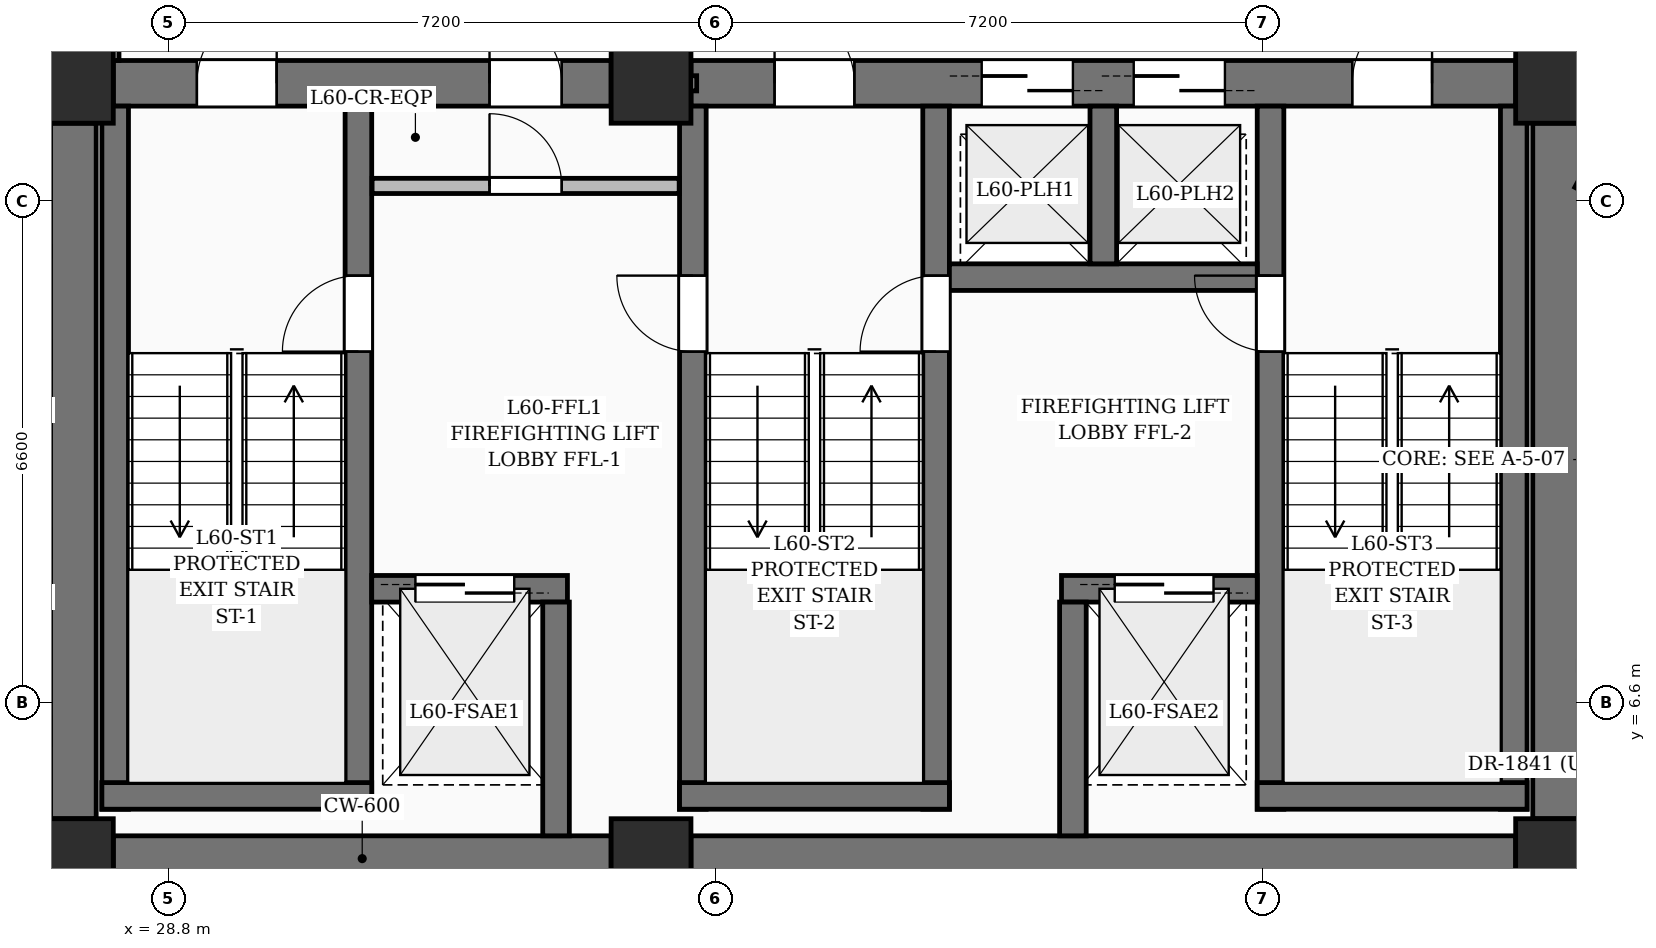
"""IFC4 building model, lengths in metres.
Left out: names, types, materials, properties, quantities, classifications, styles, units other than length and angle.
Written with IfcOpenShell. Run it as: python <this file> out.ifc"""

import sys

from ifc_helpers import new_model, si_unit, direction, frame, frame_2d, origin, origin_2d, place, context, subcontext, project, spatial, rectangle, extrude, element, fill, save


model = new_model("IFC4")
c1 = context("Model", 3, precision=1e-05, world=origin(), true_north=direction((0.0, 1.0)))
c2 = subcontext(c1, "Body", "Model", "MODEL_VIEW")
j1 = project(units=[si_unit("LENGTHUNIT", "METRE"), si_unit("PLANEANGLEUNIT", "RADIAN")], contexts=[c1])
p1 = place(None, origin())
s1 = spatial("IfcSite", under=j1, at=p1, CompositionType="ELEMENT")
p2 = place(p1, origin())
s2 = spatial("IfcBuilding", under=s1, at=p2, CompositionType="ELEMENT")
p3 = place(p2, frame((0.0, 0.0, 233.25)))
s3 = spatial("IfcBuildingStorey", under=s2, at=p3, CompositionType="ELEMENT", Elevation=233.25)
for number, where, z_axis, x_axis in (
    (1, (27.55, 4.55, 0.0), (0.0, 0.0, 1.0), (1.0, 0.0, 0.0)),
    (2, (35.15, 4.55, 0.0), (0.0, 0.0, 1.0), (1.0, 0.0, 0.0)),
    (3, (47.05, 4.55, 0.0), (0.0, 0.0, 1.0), (1.0, 0.0, 0.0)),
    (4, (27.55, 14.75, 0.0), (0.0, 0.0, 1.0), (1.0, 0.0, 0.0)),
    (5, (35.15, 14.75, 0.0), (0.0, 0.0, 1.0), (1.0, 0.0, 0.0)),
    (6, (47.05, 14.75, 0.0), (0.0, 0.0, 1.0), (1.0, 0.0, 0.0)),
):
    element("IfcColumn", number, at=place(p3, frame(where, z_axis=z_axis, x_axis=x_axis)), inside=s3, PredefinedType="COLUMN", context=c2, shape_type="SweptSolid", body=[
        extrude(rectangle(XDim=1.05, YDim=1.05, at=origin_2d()), origin(), (0.0, 0.0, 1.0), 3.75),
    ])
p4 = place(p3, frame((28.075, 4.55, 0.0), z_axis=(0.0, 0.0, 1.0), x_axis=(1.0, 0.0, 0.0)))
e7 = element("IfcWall", 7, at=p4, inside=s3, PredefinedType="SHEAR", context=c2, shape_type="SweptSolid", body=[
    extrude(rectangle(XDim=6.55, YDim=0.6, at=frame_2d((3.275, 0.0))), origin(), (0.0, 0.0, 1.0), 3.75),
])
p5 = place(p3, frame((35.675, 4.55, 0.0), z_axis=(0.0, 0.0, 1.0), x_axis=(1.0, 0.0, 0.0)))
e8 = element("IfcWall", 8, at=p5, inside=s3, PredefinedType="SHEAR", context=c2, shape_type="SweptSolid", body=[
    extrude(rectangle(XDim=10.85, YDim=0.6, at=frame_2d((5.425, 0.0))), origin(), (0.0, 0.0, 1.0), 3.75),
])
p6 = place(p3, frame((28.075, 14.75, 0.0), z_axis=(0.0, 0.0, 1.0), x_axis=(1.0, 0.0, 0.0)))
e9 = element("IfcWall", 9, at=p6, inside=s3, PredefinedType="SHEAR", context=c2, shape_type="SweptSolid", body=[
    extrude(rectangle(XDim=6.55, YDim=0.6, at=frame_2d((3.275, 0.0))), origin(), (0.0, 0.0, 1.0), 3.75),
])
p7 = place(p6, frame((1.1, 0.0, 0.0)))
e10 = element("IfcOpeningElement", 10, at=p7, cuts=e9, PredefinedType="OPENING", context=c2, shape_type="SweptSolid", body=[
    extrude(rectangle(XDim=1.05, YDim=2.15, at=frame_2d((0.525, 1.075))), frame((0.0, 0.31, 0.0), z_axis=(0.0, -1.0, 0.0), x_axis=(1.0, 0.0, 0.0)), (0.0, 0.0, 1.0), 0.62),
])
p8 = place(p6, frame((4.95, 0.0, 0.0)))
e11 = element("IfcOpeningElement", 11, at=p8, cuts=e9, PredefinedType="OPENING", context=c2, shape_type="SweptSolid", body=[
    extrude(rectangle(XDim=0.95, YDim=2.15, at=frame_2d((0.475, 1.075))), frame((0.0, 0.31, 0.0), z_axis=(0.0, -1.0, 0.0), x_axis=(1.0, 0.0, 0.0)), (0.0, 0.0, 1.0), 0.62),
])
p9 = place(p3, frame((35.675, 14.75, 0.0), z_axis=(0.0, 0.0, 1.0), x_axis=(1.0, 0.0, 0.0)))
e12 = element("IfcWall", 12, at=p9, inside=s3, PredefinedType="SHEAR", context=c2, shape_type="SweptSolid", body=[
    extrude(rectangle(XDim=10.85, YDim=0.6, at=frame_2d((5.425, 0.0))), origin(), (0.0, 0.0, 1.0), 3.75),
])
p10 = place(p9, frame((1.1, 0.0, 0.0)))
e13 = element("IfcOpeningElement", 13, at=p10, cuts=e12, PredefinedType="OPENING", context=c2, shape_type="SweptSolid", body=[
    extrude(rectangle(XDim=1.05, YDim=2.15, at=frame_2d((0.525, 1.075))), frame((0.0, 0.31, 0.0), z_axis=(0.0, -1.0, 0.0), x_axis=(1.0, 0.0, 0.0)), (0.0, 0.0, 1.0), 0.62),
])
p11 = place(p9, frame((8.7, 0.0, 0.0)))
e14 = element("IfcOpeningElement", 14, at=p11, cuts=e12, PredefinedType="OPENING", context=c2, shape_type="SweptSolid", body=[
    extrude(rectangle(XDim=1.05, YDim=2.15, at=frame_2d((0.525, 1.075))), frame((0.0, 0.31, 0.0), z_axis=(0.0, -1.0, 0.0), x_axis=(1.0, 0.0, 0.0)), (0.0, 0.0, 1.0), 0.62),
])
p12 = place(p9, frame((3.825, 0.0, 0.0)))
e15 = element("IfcOpeningElement", 15, at=p12, cuts=e12, PredefinedType="OPENING", context=c2, shape_type="SweptSolid", body=[
    extrude(rectangle(XDim=1.2, YDim=2.2, at=frame_2d((0.6, 1.1))), frame((0.0, 0.31, 0.0), z_axis=(0.0, -1.0, 0.0), x_axis=(1.0, 0.0, 0.0)), (0.0, 0.0, 1.0), 0.62),
])
p13 = place(p9, frame((5.825, 0.0, 0.0)))
e16 = element("IfcOpeningElement", 16, at=p13, cuts=e12, PredefinedType="OPENING", context=c2, shape_type="SweptSolid", body=[
    extrude(rectangle(XDim=1.2, YDim=2.2, at=frame_2d((0.6, 1.1))), frame((0.0, 0.31, 0.0), z_axis=(0.0, -1.0, 0.0), x_axis=(1.0, 0.0, 0.0)), (0.0, 0.0, 1.0), 0.62),
])
for number, where, z_axis, x_axis in (
    (17, (27.55, 5.075, 0.0), (0.0, 0.0, 1.0), (0.0, 1.0, 0.0)),
    (18, (47.05, 5.075, 0.0), (0.0, 0.0, 1.0), (0.0, 1.0, 0.0)),
):
    element("IfcWall", number, at=place(p3, frame(where, z_axis=z_axis, x_axis=x_axis)), inside=s3, PredefinedType="SHEAR", context=c2, shape_type="SweptSolid", body=[
        extrude(rectangle(XDim=9.15, YDim=0.6, at=frame_2d((4.575, 0.0))), origin(), (0.0, 0.0, 1.0), 3.75),
    ])
p14 = place(p3, frame((28.1, 5.2, 0.0), z_axis=(0.0, 0.0, 1.0), x_axis=(0.0, 1.0, 0.0)))
e19 = element("IfcWall", 19, at=p14, inside=s3, PredefinedType="SOLIDWALL", context=c2, shape_type="SweptSolid", body=[
    extrude(rectangle(XDim=9.25, YDim=0.35, at=frame_2d((4.625, 0.0))), origin(), (0.0, 0.0, 1.0), 3.75),
])
p15 = place(p3, frame((31.3, 5.2, 0.0), z_axis=(0.0, 0.0, 1.0), x_axis=(0.0, 1.0, 0.0)))
e20 = element("IfcWall", 20, at=p15, inside=s3, PredefinedType="SOLIDWALL", context=c2, shape_type="SweptSolid", body=[
    extrude(rectangle(XDim=9.25, YDim=0.35, at=frame_2d((4.625, 0.0))), origin(), (0.0, 0.0, 1.0), 3.75),
])
p16 = place(p15, frame((6.02, 0.0, 0.0)))
e21 = element("IfcOpeningElement", 21, at=p16, cuts=e20, PredefinedType="OPENING", context=c2, shape_type="SweptSolid", body=[
    extrude(rectangle(XDim=1.0, YDim=2.15, at=frame_2d((0.5, 1.075))), frame((0.0, 0.185, 0.0), z_axis=(0.0, -1.0, 0.0), x_axis=(1.0, 0.0, 0.0)), (0.0, 0.0, 1.0), 0.37),
])
p17 = place(p3, frame((27.925, 5.375, 0.0), z_axis=(0.0, 0.0, 1.0), x_axis=(1.0, 0.0, 0.0)))
e22 = element("IfcWall", 22, at=p17, inside=s3, PredefinedType="SOLIDWALL", context=c2, shape_type="SweptSolid", body=[
    extrude(rectangle(XDim=3.55, YDim=0.35, at=frame_2d((1.775, 0.0))), origin(), (0.0, 0.0, 1.0), 3.75),
])
p18 = place(p3, frame((35.7, 5.2, 0.0), z_axis=(0.0, 0.0, 1.0), x_axis=(0.0, 1.0, 0.0)))
e23 = element("IfcWall", 23, at=p18, inside=s3, PredefinedType="SOLIDWALL", context=c2, shape_type="SweptSolid", body=[
    extrude(rectangle(XDim=9.25, YDim=0.35, at=frame_2d((4.625, 0.0))), origin(), (0.0, 0.0, 1.0), 3.75),
])
p19 = place(p18, frame((6.02, 0.0, 0.0)))
e24 = element("IfcOpeningElement", 24, at=p19, cuts=e23, PredefinedType="OPENING", context=c2, shape_type="SweptSolid", body=[
    extrude(rectangle(XDim=1.0, YDim=2.15, at=frame_2d((0.5, 1.075))), frame((0.0, 0.185, 0.0), z_axis=(0.0, -1.0, 0.0), x_axis=(1.0, 0.0, 0.0)), (0.0, 0.0, 1.0), 0.37),
])
p20 = place(p3, frame((38.9, 5.2, 0.0), z_axis=(0.0, 0.0, 1.0), x_axis=(0.0, 1.0, 0.0)))
e25 = element("IfcWall", 25, at=p20, inside=s3, PredefinedType="SOLIDWALL", context=c2, shape_type="SweptSolid", body=[
    extrude(rectangle(XDim=9.25, YDim=0.35, at=frame_2d((4.625, 0.0))), origin(), (0.0, 0.0, 1.0), 3.75),
])
p21 = place(p20, frame((6.02, 0.0, 0.0)))
e26 = element("IfcOpeningElement", 26, at=p21, cuts=e25, PredefinedType="OPENING", context=c2, shape_type="SweptSolid", body=[
    extrude(rectangle(XDim=1.0, YDim=2.15, at=frame_2d((0.5, 1.075))), frame((0.0, 0.185, 0.0), z_axis=(0.0, -1.0, 0.0), x_axis=(1.0, 0.0, 0.0)), (0.0, 0.0, 1.0), 0.37),
])
p22 = place(p3, frame((35.525, 5.375, 0.0), z_axis=(0.0, 0.0, 1.0), x_axis=(1.0, 0.0, 0.0)))
e27 = element("IfcWall", 27, at=p22, inside=s3, PredefinedType="SOLIDWALL", context=c2, shape_type="SweptSolid", body=[
    extrude(rectangle(XDim=3.55, YDim=0.35, at=frame_2d((1.775, 0.0))), origin(), (0.0, 0.0, 1.0), 3.75),
])
p23 = place(p3, frame((43.3, 5.2, 0.0), z_axis=(0.0, 0.0, 1.0), x_axis=(0.0, 1.0, 0.0)))
e28 = element("IfcWall", 28, at=p23, inside=s3, PredefinedType="SOLIDWALL", context=c2, shape_type="SweptSolid", body=[
    extrude(rectangle(XDim=9.25, YDim=0.35, at=frame_2d((4.625, 0.0))), origin(), (0.0, 0.0, 1.0), 3.75),
])
p24 = place(p23, frame((6.02, 0.0, 0.0)))
e29 = element("IfcOpeningElement", 29, at=p24, cuts=e28, PredefinedType="OPENING", context=c2, shape_type="SweptSolid", body=[
    extrude(rectangle(XDim=1.0, YDim=2.15, at=frame_2d((0.5, 1.075))), frame((0.0, 0.185, 0.0), z_axis=(0.0, -1.0, 0.0), x_axis=(1.0, 0.0, 0.0)), (0.0, 0.0, 1.0), 0.37),
])
p25 = place(p3, frame((46.5, 5.2, 0.0), z_axis=(0.0, 0.0, 1.0), x_axis=(0.0, 1.0, 0.0)))
e30 = element("IfcWall", 30, at=p25, inside=s3, PredefinedType="SOLIDWALL", context=c2, shape_type="SweptSolid", body=[
    extrude(rectangle(XDim=9.25, YDim=0.35, at=frame_2d((4.625, 0.0))), origin(), (0.0, 0.0, 1.0), 3.75),
])
p26 = place(p3, frame((43.125, 5.375, 0.0), z_axis=(0.0, 0.0, 1.0), x_axis=(1.0, 0.0, 0.0)))
e31 = element("IfcWall", 31, at=p26, inside=s3, PredefinedType="SOLIDWALL", context=c2, shape_type="SweptSolid", body=[
    extrude(rectangle(XDim=3.55, YDim=0.35, at=frame_2d((1.775, 0.0))), origin(), (0.0, 0.0, 1.0), 3.75),
])
p27 = place(p3, frame((31.475, 8.1, 0.0), z_axis=(0.0, 0.0, 1.0), x_axis=(1.0, 0.0, 0.0)))
e32 = element("IfcWall", 32, at=p27, inside=s3, PredefinedType="SOLIDWALL", context=c2, shape_type="SweptSolid", body=[
    extrude(rectangle(XDim=2.575, YDim=0.35, at=frame_2d((1.288, 0.0))), origin(), (0.0, 0.0, 1.0), 3.75),
])
p28 = place(p27, frame((0.575, 0.0, 0.0)))
e33 = element("IfcOpeningElement", 33, at=p28, cuts=e32, PredefinedType="OPENING", context=c2, shape_type="SweptSolid", body=[
    extrude(rectangle(XDim=1.3, YDim=2.25, at=frame_2d((0.65, 1.125))), frame((0.0, 0.185, 0.0), z_axis=(0.0, -1.0, 0.0), x_axis=(1.0, 0.0, 0.0)), (0.0, 0.0, 1.0), 0.37),
])
p29 = place(p3, frame((40.55, 8.1, 0.0), z_axis=(0.0, 0.0, 1.0), x_axis=(1.0, 0.0, 0.0)))
e34 = element("IfcWall", 34, at=p29, inside=s3, PredefinedType="SOLIDWALL", context=c2, shape_type="SweptSolid", body=[
    extrude(rectangle(XDim=2.575, YDim=0.35, at=frame_2d((1.288, 0.0))), origin(), (0.0, 0.0, 1.0), 3.75),
])
p30 = place(p29, frame((0.7, 0.0, 0.0)))
e35 = element("IfcOpeningElement", 35, at=p30, cuts=e34, PredefinedType="OPENING", context=c2, shape_type="SweptSolid", body=[
    extrude(rectangle(XDim=1.3, YDim=2.25, at=frame_2d((0.65, 1.125))), frame((0.0, 0.185, 0.0), z_axis=(0.0, -1.0, 0.0), x_axis=(1.0, 0.0, 0.0)), (0.0, 0.0, 1.0), 0.37),
])
for number, where, z_axis, x_axis in (
    (36, (33.9, 4.85, 0.0), (0.0, 0.0, 1.0), (0.0, 1.0, 0.0)),
    (37, (40.7, 4.85, 0.0), (0.0, 0.0, 1.0), (0.0, 1.0, 0.0)),
):
    element("IfcWall", number, at=place(p3, frame(where, z_axis=z_axis, x_axis=x_axis)), inside=s3, PredefinedType="SOLIDWALL", context=c2, shape_type="SweptSolid", body=[
        extrude(rectangle(XDim=3.075, YDim=0.35, at=frame_2d((1.538, 0.0))), origin(), (0.0, 0.0, 1.0), 3.75),
    ])
p31 = place(p3, frame((39.075, 12.2, 0.0), z_axis=(0.0, 0.0, 1.0), x_axis=(1.0, 0.0, 0.0)))
e38 = element("IfcWall", 38, at=p31, inside=s3, PredefinedType="SOLIDWALL", context=c2, shape_type="SweptSolid", body=[
    extrude(rectangle(XDim=4.05, YDim=0.35, at=frame_2d((2.025, 0.0))), origin(), (0.0, 0.0, 1.0), 3.75),
])
p32 = place(p3, frame((41.1, 12.375, 0.0), z_axis=(0.0, 0.0, 1.0), x_axis=(0.0, 1.0, 0.0)))
e39 = element("IfcWall", 39, at=p32, inside=s3, PredefinedType="SOLIDWALL", context=c2, shape_type="SweptSolid", body=[
    extrude(rectangle(XDim=2.075, YDim=0.35, at=frame_2d((1.038, 0.0))), origin(), (0.0, 0.0, 1.0), 3.75),
])
p33 = place(p3, frame((34.72, 14.75, 0.0), z_axis=(0.0, 0.0, 1.0), x_axis=(1.0, 0.0, 0.0)))
e40 = element("IfcWall", 40, at=p33, inside=s3, PredefinedType="PARTITIONING", context=c2, shape_type="SweptSolid", body=[
    extrude(rectangle(XDim=1.03, YDim=0.2, at=frame_2d((0.515, 0.0))), origin(), (0.0, 0.0, 1.0), 2.685),
])
p34 = place(p3, frame((31.48, 13.4, 0.0), z_axis=(0.0, 0.0, 1.0), x_axis=(1.0, 0.0, 0.0)))
e41 = element("IfcWall", 41, at=p34, inside=s3, PredefinedType="PARTITIONING", context=c2, shape_type="SweptSolid", body=[
    extrude(rectangle(XDim=4.04, YDim=0.2, at=frame_2d((2.02, 0.0))), origin(), (0.0, 0.0, 1.0), 3.5),
])
p35 = place(p34, frame((1.545, 0.0, 0.0)))
e42 = element("IfcOpeningElement", 42, at=p35, cuts=e41, PredefinedType="OPENING", context=c2, shape_type="SweptSolid", body=[
    extrude(rectangle(XDim=0.95, YDim=2.15, at=frame_2d((0.475, 1.075))), frame((0.0, 0.11, 0.0), z_axis=(0.0, -1.0, 0.0), x_axis=(1.0, 0.0, 0.0)), (0.0, 0.0, 1.0), 0.22),
])
p36 = place(p3, frame((28.05, 16.75, 0.0), z_axis=(0.0, 0.0, 1.0), x_axis=(0.0, -1.0, 0.0)))
e43 = element("IfcWall", 43, at=p36, inside=s3, PredefinedType="PARTITIONING", context=c2, shape_type="SweptSolid", body=[
    extrude(rectangle(XDim=1.7, YDim=0.2, at=frame_2d((0.85, 0.0))), origin(), (0.0, 0.0, 1.0), 3.5),
])
p37 = place(p36, frame((0.35, 0.0, 0.0)))
e44 = element("IfcOpeningElement", 44, at=p37, cuts=e43, PredefinedType="OPENING", context=c2, shape_type="SweptSolid", body=[
    extrude(rectangle(XDim=1.0, YDim=2.2, at=frame_2d((0.5, 1.1))), frame((0.0, 0.11, 0.0), z_axis=(0.0, -1.0, 0.0), x_axis=(1.0, 0.0, 0.0)), (0.0, 0.0, 1.0), 0.22),
])
p38 = place(p3, frame((46.8, 15.05, 0.0), z_axis=(0.0, 0.0, 1.0), x_axis=(0.0, 1.0, 0.0)))
e45 = element("IfcWall", 45, at=p38, inside=s3, PredefinedType="PARTITIONING", context=c2, shape_type="SweptSolid", body=[
    extrude(rectangle(XDim=1.7, YDim=0.2, at=frame_2d((0.85, 0.0))), origin(), (0.0, 0.0, 1.0), 2.685),
])
p39 = place(p3, frame((50.695, 11.69, 0.0), z_axis=(0.0, 0.0, 1.0), x_axis=(-0.882785979597, 0.469775386996, 0.0)))
e46 = element("IfcWall", 46, at=p39, inside=s3, PredefinedType="PARTITIONING", context=c2, shape_type="SweptSolid", body=[
    extrude(rectangle(XDim=3.789, YDim=0.2, at=frame_2d((1.895, 0.0))), origin(), (0.0, 0.0, 1.0), 3.5),
])
p40 = place(p39, frame((1.352, 0.0, 0.0)))
e47 = element("IfcOpeningElement", 47, at=p40, cuts=e46, PredefinedType="OPENING", context=c2, shape_type="SweptSolid", body=[
    extrude(rectangle(XDim=1.0, YDim=2.2, at=frame_2d((0.5, 1.1))), frame((0.0, 0.11, 0.0), z_axis=(0.0, -1.0, 0.0), x_axis=(1.0, 0.0, 0.0)), (0.0, 0.0, 1.0), 0.22),
])
p41 = place(p7, origin())
e48 = element("IfcDoor", 48, at=p41, inside=s3, OperationType="SINGLE_SWING_RIGHT", PredefinedType="DOOR", context=c2, shape_type="SweptSolid", body=[
    extrude(rectangle(XDim=1.05, YDim=2.15, at=frame_2d((0.525, 1.075))), frame((0.0, 0.025, 0.0), z_axis=(0.0, -1.0, 0.0), x_axis=(1.0, 0.0, 0.0)), (0.0, 0.0, 1.0), 0.05),
])
fill(e10, e48)
p42 = place(p10, origin())
e49 = element("IfcDoor", 49, at=p42, inside=s3, OperationType="SINGLE_SWING_LEFT", PredefinedType="DOOR", context=c2, shape_type="SweptSolid", body=[
    extrude(rectangle(XDim=1.05, YDim=2.15, at=frame_2d((0.525, 1.075))), frame((0.0, 0.025, 0.0), z_axis=(0.0, -1.0, 0.0), x_axis=(1.0, 0.0, 0.0)), (0.0, 0.0, 1.0), 0.05),
])
fill(e13, e49)
p43 = place(p11, origin())
e50 = element("IfcDoor", 50, at=p43, inside=s3, OperationType="SINGLE_SWING_RIGHT", PredefinedType="DOOR", context=c2, shape_type="SweptSolid", body=[
    extrude(rectangle(XDim=1.05, YDim=2.15, at=frame_2d((0.525, 1.075))), frame((0.0, 0.025, 0.0), z_axis=(0.0, -1.0, 0.0), x_axis=(1.0, 0.0, 0.0)), (0.0, 0.0, 1.0), 0.05),
])
fill(e14, e50)
p44 = place(p16, origin())
e51 = element("IfcDoor", 51, at=p44, inside=s3, OperationType="SINGLE_SWING_LEFT", PredefinedType="DOOR", context=c2, shape_type="SweptSolid", body=[
    extrude(rectangle(XDim=1.0, YDim=2.15, at=frame_2d((0.5, 1.075))), frame((0.0, 0.025, 0.0), z_axis=(0.0, -1.0, 0.0), x_axis=(1.0, 0.0, 0.0)), (0.0, 0.0, 1.0), 0.05),
])
fill(e21, e51)
p45 = place(p19, origin())
e52 = element("IfcDoor", 52, at=p45, inside=s3, OperationType="SINGLE_SWING_RIGHT", PredefinedType="DOOR", context=c2, shape_type="SweptSolid", body=[
    extrude(rectangle(XDim=1.0, YDim=2.15, at=frame_2d((0.5, 1.075))), frame((0.0, 0.025, 0.0), z_axis=(0.0, -1.0, 0.0), x_axis=(1.0, 0.0, 0.0)), (0.0, 0.0, 1.0), 0.05),
])
fill(e24, e52)
p46 = place(p21, origin())
e53 = element("IfcDoor", 53, at=p46, inside=s3, OperationType="SINGLE_SWING_LEFT", PredefinedType="DOOR", context=c2, shape_type="SweptSolid", body=[
    extrude(rectangle(XDim=1.0, YDim=2.15, at=frame_2d((0.5, 1.075))), frame((0.0, 0.025, 0.0), z_axis=(0.0, -1.0, 0.0), x_axis=(1.0, 0.0, 0.0)), (0.0, 0.0, 1.0), 0.05),
])
fill(e26, e53)
p47 = place(p24, origin())
e54 = element("IfcDoor", 54, at=p47, inside=s3, OperationType="SINGLE_SWING_RIGHT", PredefinedType="DOOR", context=c2, shape_type="SweptSolid", body=[
    extrude(rectangle(XDim=1.0, YDim=2.15, at=frame_2d((0.5, 1.075))), frame((0.0, 0.025, 0.0), z_axis=(0.0, -1.0, 0.0), x_axis=(1.0, 0.0, 0.0)), (0.0, 0.0, 1.0), 0.05),
])
fill(e29, e54)
p48 = place(p28, origin())
e55 = element("IfcDoor", 55, at=p48, inside=s3, OperationType="DOUBLE_DOOR_SLIDING", PredefinedType="DOOR", context=c2, shape_type="SweptSolid", body=[
    extrude(rectangle(XDim=1.3, YDim=2.25, at=frame_2d((0.65, 1.125))), frame((0.0, 0.025, 0.0), z_axis=(0.0, -1.0, 0.0), x_axis=(1.0, 0.0, 0.0)), (0.0, 0.0, 1.0), 0.05),
])
fill(e33, e55)
p49 = place(p30, origin())
e56 = element("IfcDoor", 56, at=p49, inside=s3, OperationType="DOUBLE_DOOR_SLIDING", PredefinedType="DOOR", context=c2, shape_type="SweptSolid", body=[
    extrude(rectangle(XDim=1.3, YDim=2.25, at=frame_2d((0.65, 1.125))), frame((0.0, 0.025, 0.0), z_axis=(0.0, -1.0, 0.0), x_axis=(1.0, 0.0, 0.0)), (0.0, 0.0, 1.0), 0.05),
])
fill(e35, e56)
p50 = place(p12, origin())
e57 = element("IfcDoor", 57, at=p50, inside=s3, OperationType="DOUBLE_DOOR_SLIDING", PredefinedType="DOOR", context=c2, shape_type="SweptSolid", body=[
    extrude(rectangle(XDim=1.2, YDim=2.2, at=frame_2d((0.6, 1.1))), frame((0.0, 0.025, 0.0), z_axis=(0.0, -1.0, 0.0), x_axis=(1.0, 0.0, 0.0)), (0.0, 0.0, 1.0), 0.05),
])
fill(e15, e57)
p51 = place(p13, origin())
e58 = element("IfcDoor", 58, at=p51, inside=s3, OperationType="DOUBLE_DOOR_SLIDING", PredefinedType="DOOR", context=c2, shape_type="SweptSolid", body=[
    extrude(rectangle(XDim=1.2, YDim=2.2, at=frame_2d((0.6, 1.1))), frame((0.0, 0.025, 0.0), z_axis=(0.0, -1.0, 0.0), x_axis=(1.0, 0.0, 0.0)), (0.0, 0.0, 1.0), 0.05),
])
fill(e16, e58)
p52 = place(p35, origin())
e59 = element("IfcDoor", 59, at=p52, inside=s3, OperationType="SINGLE_SWING_LEFT", PredefinedType="DOOR", context=c2, shape_type="SweptSolid", body=[
    extrude(rectangle(XDim=0.95, YDim=2.15, at=frame_2d((0.475, 1.075))), frame((0.0, 0.025, 0.0), z_axis=(0.0, -1.0, 0.0), x_axis=(1.0, 0.0, 0.0)), (0.0, 0.0, 1.0), 0.05),
])
fill(e42, e59)
p53 = place(p8, origin())
e60 = element("IfcDoor", 60, at=p53, inside=s3, OperationType="SINGLE_SWING_LEFT", PredefinedType="DOOR", context=c2, shape_type="SweptSolid", body=[
    extrude(rectangle(XDim=0.95, YDim=2.15, at=frame_2d((0.475, 1.075))), frame((0.0, 0.025, 0.0), z_axis=(0.0, -1.0, 0.0), x_axis=(1.0, 0.0, 0.0)), (0.0, 0.0, 1.0), 0.05),
])
fill(e11, e60)
save(model, sys.argv[1])
